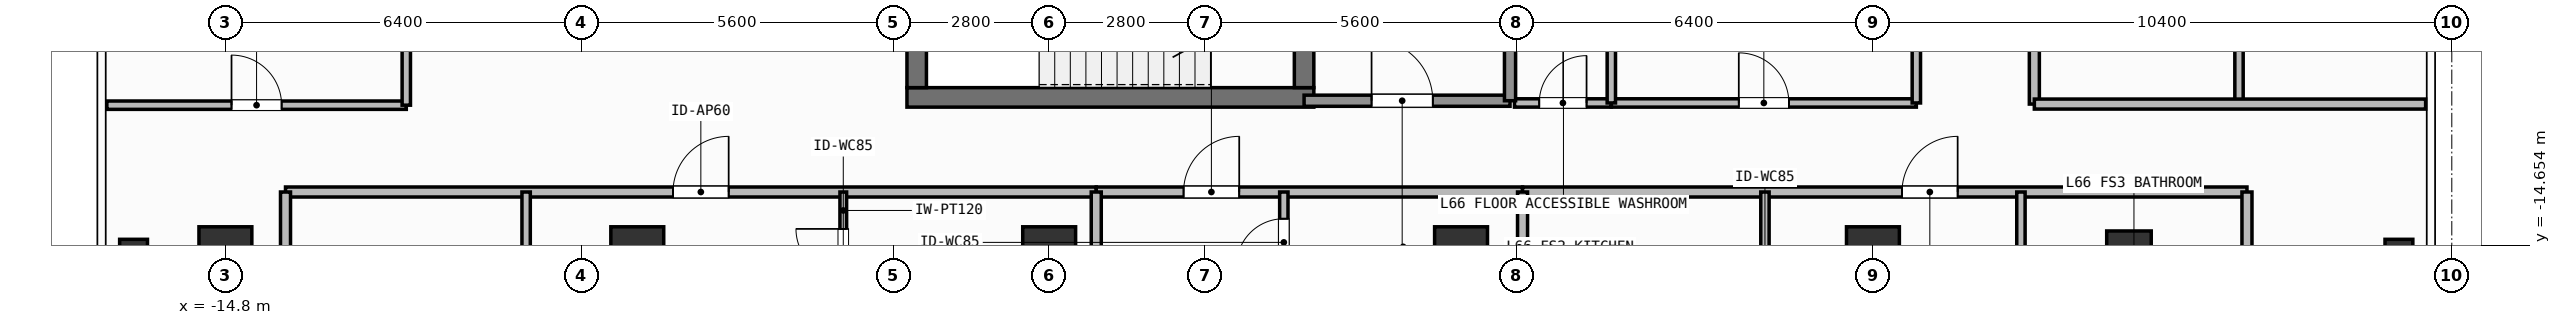
"""IFC4 building model, lengths in metres.
Left out: names, types, materials, properties, quantities, classifications, styles, units other than length and angle.
Written with IfcOpenShell. Run it as: python <this file> out.ifc"""

import sys

from ifc_helpers import new_model, si_unit, direction, frame, frame_2d, origin, origin_2d, place, context, subcontext, project, spatial, rectangle, hollow_rectangle, extrude, element, fill, save


model = new_model("IFC4")
c1 = context("Model", 3, precision=1e-05, world=origin(), true_north=direction((0.0, 1.0)))
c2 = subcontext(c1, "Body", "Model", "MODEL_VIEW")
j1 = project(units=[si_unit("LENGTHUNIT", "METRE"), si_unit("PLANEANGLEUNIT", "RADIAN")], contexts=[c1])
p1 = place(None, origin())
s1 = spatial("IfcSite", under=j1, at=p1, CompositionType="ELEMENT")
p2 = place(p1, origin())
s2 = spatial("IfcBuilding", under=s1, at=p2, CompositionType="ELEMENT")
p3 = place(p2, frame((0.0, 0.0, 270.3)))
s3 = spatial("IfcBuildingStorey", under=s2, at=p3, CompositionType="ELEMENT", Elevation=270.3)
p4 = place(p3, frame((-2.555, -12.0, 0.0), z_axis=(0.0, 0.0, 1.0), x_axis=(1.0, 0.0, 0.0)))
e1 = element("IfcWall", 1, at=p4, inside=s3, PredefinedType="SHEAR", context=c2, shape_type="SweptSolid", body=[
    extrude(rectangle(XDim=7.31, YDim=0.35, at=frame_2d((3.655, 0.0))), origin(), (0.0, 0.0, 1.0), 3.9),
])
p5 = place(p3, frame((-2.38, -11.825, 0.0), z_axis=(0.0, 0.0, 1.0), x_axis=(0.0, 1.0, 0.0)))
e2 = element("IfcWall", 2, at=p5, inside=s3, PredefinedType="SHEAR", context=c2, shape_type="SweptSolid", body=[
    extrude(rectangle(XDim=2.925, YDim=0.35, at=frame_2d((1.462, 0.0))), origin(), (0.0, 0.0, 1.0), 3.9),
])
p6 = place(p3, frame((4.58, -8.9, 0.0), z_axis=(0.0, 0.0, 1.0), x_axis=(0.0, -1.0, 0.0)))
e3 = element("IfcWall", 3, at=p6, inside=s3, PredefinedType="SHEAR", context=c2, shape_type="SweptSolid", body=[
    extrude(rectangle(XDim=2.925, YDim=0.35, at=frame_2d((1.462, 0.0))), origin(), (0.0, 0.0, 1.0), 3.9),
])
p7 = place(p6, frame((0.913, 0.0, 0.0)))
e4 = element("IfcOpeningElement", 4, at=p7, cuts=e3, PredefinedType="OPENING", context=c2, shape_type="SweptSolid", body=[
    extrude(rectangle(XDim=1.1, YDim=2.15, at=frame_2d((0.55, 1.075))), frame((0.0, 0.185, 0.0), z_axis=(0.0, -1.0, 0.0), x_axis=(1.0, 0.0, 0.0)), (0.0, 0.0, 1.0), 0.37),
])
for number, where, z_axis, x_axis in (
    (5, (-14.8, -14.8, 0.0), (0.0, 0.0, 1.0), (1.0, 0.0, 0.0)),
    (6, (-7.4, -14.8, 0.0), (0.0, 0.0, 1.0), (1.0, 0.0, 0.0)),
    (7, (0.0, -14.8, 0.0), (0.0, 0.0, 1.0), (1.0, 0.0, 0.0)),
    (8, (7.4, -14.8, 0.0), (0.0, 0.0, 1.0), (1.0, 0.0, 0.0)),
    (9, (14.8, -14.8, 0.0), (0.0, 0.0, 1.0), (1.0, 0.0, 0.0)),
):
    element("IfcColumn", number, at=place(p3, frame(where, z_axis=z_axis, x_axis=x_axis)), inside=s3, PredefinedType="COLUMN", context=c2, shape_type="SweptSolid", body=[
        extrude(rectangle(XDim=0.95, YDim=0.95, at=origin_2d()), origin(), (0.0, 0.0, 1.0), 3.9),
    ])
p8 = place(p3, frame((19.4, -14.8, 0.0), z_axis=(0.0, 0.0, 1.0), x_axis=(1.0, 0.0, 0.0)))
e10 = element("IfcColumn", 10, at=p8, inside=s3, PredefinedType="COLUMN", context=c2, shape_type="SweptSolid", body=[
    extrude(hollow_rectangle(XDim=0.8, YDim=0.8, WallThickness=0.036, at=origin_2d()), origin(), (0.0, 0.0, 1.0), 3.9),
])
for number, where, z_axis, x_axis in (
    (11, (-16.45, -14.8, 0.0), (0.0, 0.0, 1.0), (1.0, 0.0, 0.0)),
    (12, (24.25, -14.8, 0.0), (0.0, 0.0, 1.0), (1.0, 0.0, 0.0)),
):
    element("IfcColumn", number, at=place(p3, frame(where, z_axis=z_axis, x_axis=x_axis)), inside=s3, PredefinedType="COLUMN", context=c2, shape_type="SweptSolid", body=[
        extrude(hollow_rectangle(XDim=0.5, YDim=0.5, WallThickness=0.025, at=origin_2d()), origin(), (0.0, 0.0, 1.0), 3.9),
    ])
p9 = place(p3, frame((4.58, -12.06, 0.0), z_axis=(0.0, 0.0, 1.0), x_axis=(1.0, 0.0, 0.0)))
e13 = element("IfcWall", 13, at=p9, inside=s3, PredefinedType="SOLIDWALL", context=c2, shape_type="SweptSolid", body=[
    extrude(rectangle(XDim=3.7, YDim=0.2, at=frame_2d((1.85, 0.0))), origin(), (0.0, 0.0, 1.0), 3.68),
])
p10 = place(p9, frame((1.212, 0.0, 0.0)))
e14 = element("IfcOpeningElement", 14, at=p10, cuts=e13, PredefinedType="OPENING", context=c2, shape_type="SweptSolid", body=[
    extrude(rectangle(XDim=1.1, YDim=2.15, at=frame_2d((0.55, 1.075))), frame((0.0, 0.11, 0.0), z_axis=(0.0, -1.0, 0.0), x_axis=(1.0, 0.0, 0.0)), (0.0, 0.0, 1.0), 0.22),
])
p11 = place(p3, frame((8.36, -12.1, 0.0), z_axis=(0.0, 0.0, 1.0), x_axis=(1.0, 0.0, 0.0)))
e15 = element("IfcWall", 15, at=p11, inside=s3, PredefinedType="PARTITIONING", context=c2, shape_type="SweptSolid", body=[
    extrude(rectangle(XDim=1.74, YDim=0.15, at=frame_2d((0.87, 0.0))), origin(), (0.0, 0.0, 1.0), 3.68),
])
p12 = place(p11, frame((0.445, 0.0, 0.0)))
e16 = element("IfcOpeningElement", 16, at=p12, cuts=e15, PredefinedType="OPENING", context=c2, shape_type="SweptSolid", body=[
    extrude(rectangle(XDim=0.85, YDim=2.1, at=frame_2d((0.425, 1.05))), frame((0.0, 0.085, 0.0), z_axis=(0.0, -1.0, 0.0), x_axis=(1.0, 0.0, 0.0)), (0.0, 0.0, 1.0), 0.17),
])
p13 = place(p3, frame((10.1, -12.1, 0.0), z_axis=(0.0, 0.0, 1.0), x_axis=(1.0, 0.0, 0.0)))
e17 = element("IfcWall", 17, at=p13, inside=s3, PredefinedType="PARTITIONING", context=c2, shape_type="SweptSolid", body=[
    extrude(rectangle(XDim=5.48, YDim=0.15, at=frame_2d((2.74, 0.0))), origin(), (0.0, 0.0, 1.0), 3.68),
])
p14 = place(p13, frame((2.29, 0.0, 0.0)))
e18 = element("IfcOpeningElement", 18, at=p14, cuts=e17, PredefinedType="OPENING", context=c2, shape_type="SweptSolid", body=[
    extrude(rectangle(XDim=0.9, YDim=2.1, at=frame_2d((0.45, 1.05))), frame((0.0, 0.085, 0.0), z_axis=(0.0, -1.0, 0.0), x_axis=(1.0, 0.0, 0.0)), (0.0, 0.0, 1.0), 0.17),
])
p15 = place(p3, frame((-13.72, -13.7, 0.0), z_axis=(0.0, 0.0, 1.0), x_axis=(1.0, 0.0, 0.0)))
e19 = element("IfcWall", 19, at=p15, inside=s3, PredefinedType="PARTITIONING", context=c2, shape_type="SweptSolid", body=[
    extrude(rectangle(XDim=14.566, YDim=0.18, at=frame_2d((7.283, 0.0))), origin(), (0.0, 0.0, 1.0), 3.68),
])
p16 = place(p15, frame((6.962, 0.0, 0.0)))
e20 = element("IfcOpeningElement", 20, at=p16, cuts=e19, PredefinedType="OPENING", context=c2, shape_type="SweptSolid", body=[
    extrude(rectangle(XDim=1.0, YDim=2.2, at=frame_2d((0.5, 1.1))), frame((0.0, 0.1, 0.0), z_axis=(0.0, -1.0, 0.0), x_axis=(1.0, 0.0, 0.0)), (0.0, 0.0, 1.0), 0.2),
])
p17 = place(p3, frame((-9.397, -17.586, 0.0), z_axis=(0.0, 0.0, 1.0), x_axis=(0.0, 1.0, 0.0)))
e21 = element("IfcWall", 21, at=p17, inside=s3, PredefinedType="PARTITIONING", context=c2, shape_type="SweptSolid", body=[
    extrude(rectangle(XDim=3.886, YDim=0.15, at=frame_2d((1.943, 0.0))), origin(), (0.0, 0.0, 1.0), 3.68),
])
p18 = place(p17, frame((1.518, 0.0, 0.0)))
e22 = element("IfcOpeningElement", 22, at=p18, cuts=e21, PredefinedType="OPENING", context=c2, shape_type="SweptSolid", body=[
    extrude(rectangle(XDim=0.85, YDim=2.1, at=frame_2d((0.425, 1.05))), frame((0.0, 0.085, 0.0), z_axis=(0.0, -1.0, 0.0), x_axis=(1.0, 0.0, 0.0)), (0.0, 0.0, 1.0), 0.17),
])
p19 = place(p3, frame((-3.699, -15.876, 0.0), z_axis=(0.0, 0.0, 1.0), x_axis=(0.0, 1.0, 0.0)))
e23 = element("IfcWall", 23, at=p19, inside=s3, PredefinedType="PARTITIONING", context=c2, shape_type="SweptSolid", body=[
    extrude(rectangle(XDim=2.176, YDim=0.12, at=frame_2d((1.088, 0.0))), origin(), (0.0, 0.0, 1.0), 3.68),
])
p20 = place(p19, frame((0.663, 0.0, 0.0)))
e24 = element("IfcOpeningElement", 24, at=p20, cuts=e23, PredefinedType="OPENING", context=c2, shape_type="SweptSolid", body=[
    extrude(rectangle(XDim=0.85, YDim=2.1, at=frame_2d((0.425, 1.05))), frame((0.0, 0.07, 0.0), z_axis=(0.0, -1.0, 0.0), x_axis=(1.0, 0.0, 0.0)), (0.0, 0.0, 1.0), 0.14),
])
p21 = place(p3, frame((0.846, -13.7, 0.0), z_axis=(0.0, 0.0, 1.0), x_axis=(1.0, 0.0, 0.0)))
e25 = element("IfcWall", 25, at=p21, inside=s3, PredefinedType="PARTITIONING", context=c2, shape_type="SweptSolid", body=[
    extrude(rectangle(XDim=7.659, YDim=0.18, at=frame_2d((3.83, 0.0))), origin(), (0.0, 0.0, 1.0), 3.68),
])
p22 = place(p21, frame((1.569, 0.0, 0.0)))
e26 = element("IfcOpeningElement", 26, at=p22, cuts=e25, PredefinedType="OPENING", context=c2, shape_type="SweptSolid", body=[
    extrude(rectangle(XDim=1.0, YDim=2.2, at=frame_2d((0.5, 1.1))), frame((0.0, 0.1, 0.0), z_axis=(0.0, -1.0, 0.0), x_axis=(1.0, 0.0, 0.0)), (0.0, 0.0, 1.0), 0.2),
])
p23 = place(p3, frame((4.216, -15.67, 0.0), z_axis=(0.0, 0.0, 1.0), x_axis=(0.0, 1.0, 0.0)))
e27 = element("IfcWall", 27, at=p23, inside=s3, PredefinedType="PARTITIONING", context=c2, shape_type="SweptSolid", body=[
    extrude(rectangle(XDim=1.97, YDim=0.15, at=frame_2d((0.985, 0.0))), origin(), (0.0, 0.0, 1.0), 3.68),
])
p24 = place(p23, frame((0.64, 0.0, 0.0)))
e28 = element("IfcOpeningElement", 28, at=p24, cuts=e27, PredefinedType="OPENING", context=c2, shape_type="SweptSolid", body=[
    extrude(rectangle(XDim=0.85, YDim=2.1, at=frame_2d((0.425, 1.05))), frame((0.0, 0.085, 0.0), z_axis=(0.0, -1.0, 0.0), x_axis=(1.0, 0.0, 0.0)), (0.0, 0.0, 1.0), 0.17),
])
p25 = place(p3, frame((8.505, -13.7, 0.0), z_axis=(0.0, 0.0, 1.0), x_axis=(1.0, 0.0, 0.0)))
e29 = element("IfcWall", 29, at=p25, inside=s3, PredefinedType="PARTITIONING", context=c2, shape_type="SweptSolid", body=[
    extrude(rectangle(XDim=13.015, YDim=0.18, at=frame_2d((6.508, 0.0))), origin(), (0.0, 0.0, 1.0), 3.68),
])
p26 = place(p25, frame((6.817, 0.0, 0.0)))
e30 = element("IfcOpeningElement", 30, at=p26, cuts=e29, PredefinedType="OPENING", context=c2, shape_type="SweptSolid", body=[
    extrude(rectangle(XDim=1.0, YDim=2.2, at=frame_2d((0.5, 1.1))), frame((0.0, 0.1, 0.0), z_axis=(0.0, -1.0, 0.0), x_axis=(1.0, 0.0, 0.0)), (0.0, 0.0, 1.0), 0.2),
])
p27 = place(p3, frame((12.86, -16.983, 0.0), z_axis=(0.0, 0.0, 1.0), x_axis=(0.0, 1.0, 0.0)))
e31 = element("IfcWall", 31, at=p27, inside=s3, PredefinedType="PARTITIONING", context=c2, shape_type="SweptSolid", body=[
    extrude(rectangle(XDim=3.283, YDim=0.15, at=frame_2d((1.642, 0.0))), origin(), (0.0, 0.0, 1.0), 3.68),
])
p28 = place(p27, frame((1.217, 0.0, 0.0)))
e32 = element("IfcOpeningElement", 32, at=p28, cuts=e31, PredefinedType="OPENING", context=c2, shape_type="SweptSolid", body=[
    extrude(rectangle(XDim=0.85, YDim=2.1, at=frame_2d((0.425, 1.05))), frame((0.0, 0.085, 0.0), z_axis=(0.0, -1.0, 0.0), x_axis=(1.0, 0.0, 0.0)), (0.0, 0.0, 1.0), 0.17),
])
p29 = place(p3, frame((17.459, -16.983, 0.0), z_axis=(0.0, 0.0, 1.0), x_axis=(0.0, 1.0, 0.0)))
e33 = element("IfcWall", 33, at=p29, inside=s3, PredefinedType="PARTITIONING", context=c2, shape_type="SweptSolid", body=[
    extrude(rectangle(XDim=3.283, YDim=0.15, at=frame_2d((1.642, 0.0))), origin(), (0.0, 0.0, 1.0), 3.68),
])
p30 = place(p29, frame((0.688, 0.0, 0.0)))
e34 = element("IfcOpeningElement", 34, at=p30, cuts=e33, PredefinedType="OPENING", context=c2, shape_type="SweptSolid", body=[
    extrude(rectangle(XDim=0.85, YDim=2.1, at=frame_2d((0.425, 1.05))), frame((0.0, 0.085, 0.0), z_axis=(0.0, -1.0, 0.0), x_axis=(1.0, 0.0, 0.0)), (0.0, 0.0, 1.0), 0.17),
])
p31 = place(p3, frame((-16.93, -12.14, 0.0), z_axis=(0.0, 0.0, 1.0), x_axis=(1.0, 0.0, 0.0)))
e35 = element("IfcWall", 35, at=p31, inside=s3, PredefinedType="PARTITIONING", context=c2, shape_type="SweptSolid", body=[
    extrude(rectangle(XDim=5.38, YDim=0.15, at=frame_2d((2.69, 0.0))), origin(), (0.0, 0.0, 1.0), 3.68),
])
p32 = place(p31, frame((2.24, 0.0, 0.0)))
e36 = element("IfcOpeningElement", 36, at=p32, cuts=e35, PredefinedType="OPENING", context=c2, shape_type="SweptSolid", body=[
    extrude(rectangle(XDim=0.9, YDim=2.1, at=frame_2d((0.45, 1.05))), frame((0.0, 0.085, 0.0), z_axis=(0.0, -1.0, 0.0), x_axis=(1.0, 0.0, 0.0)), (0.0, 0.0, 1.0), 0.17),
])
p33 = place(p3, frame((17.7, -12.12, 0.0), z_axis=(0.0, 0.0, 1.0), x_axis=(0.0, 1.0, 0.0)))
e37 = element("IfcWall", 37, at=p33, inside=s3, PredefinedType="PARTITIONING", context=c2, shape_type="SweptSolid", body=[
    extrude(rectangle(XDim=24.24, YDim=0.18, at=frame_2d((12.12, 0.0))), origin(), (0.0, 0.0, 1.0), 3.68),
])
p34 = place(p33, frame((11.62, 0.0, 0.0)))
e38 = element("IfcOpeningElement", 38, at=p34, cuts=e37, PredefinedType="OPENING", context=c2, shape_type="SweptSolid", body=[
    extrude(rectangle(XDim=1.0, YDim=2.2, at=frame_2d((0.5, 1.1))), frame((0.0, 0.1, 0.0), z_axis=(0.0, -1.0, 0.0), x_axis=(1.0, 0.0, 0.0)), (0.0, 0.0, 1.0), 0.2),
])
p35 = place(p3, frame((8.28, -12.06, 0.0), z_axis=(0.0, 0.0, 1.0), x_axis=(0.0, 1.0, 0.0)))
e39 = element("IfcWall", 39, at=p35, inside=s3, PredefinedType="SOLIDWALL", context=c2, shape_type="SweptSolid", body=[
    extrude(rectangle(XDim=3.335, YDim=0.2, at=frame_2d((1.667, 0.0))), origin(), (0.0, 0.0, 1.0), 3.68),
])
p36 = place(p3, frame((10.1, -12.1, 0.0), z_axis=(0.0, 0.0, 1.0), x_axis=(0.0, 1.0, 0.0)))
e40 = element("IfcWall", 40, at=p36, inside=s3, PredefinedType="PARTITIONING", context=c2, shape_type="SweptSolid", body=[
    extrude(rectangle(XDim=2.35, YDim=0.15, at=frame_2d((1.175, 0.0))), origin(), (0.0, 0.0, 1.0), 3.68),
])
p37 = place(p3, frame((15.58, -12.1, 0.0), z_axis=(0.0, 0.0, 1.0), x_axis=(0.0, 1.0, 0.0)))
e41 = element("IfcWall", 41, at=p37, inside=s3, PredefinedType="PARTITIONING", context=c2, shape_type="SweptSolid", body=[
    extrude(rectangle(XDim=6.25, YDim=0.15, at=frame_2d((3.125, 0.0))), origin(), (0.0, 0.0, 1.0), 3.68),
])
for number, where, z_axis, x_axis in (
    (42, (-13.72, -19.51, 0.0), (0.0, 0.0, 1.0), (0.0, 1.0, 0.0)),
    (43, (21.52, -19.51, 0.0), (0.0, 0.0, 1.0), (0.0, 1.0, 0.0)),
):
    element("IfcWall", number, at=place(p3, frame(where, z_axis=z_axis, x_axis=x_axis)), inside=s3, PredefinedType="PARTITIONING", context=c2, shape_type="SweptSolid", body=[
        extrude(rectangle(XDim=5.81, YDim=0.18, at=frame_2d((2.905, 0.0))), origin(), (0.0, 0.0, 1.0), 3.68),
    ])
for number, where, z_axis, x_axis in (
    (44, (0.846, -20.63, 0.0), (0.0, 0.0, 1.0), (0.0, 1.0, 0.0)),
    (45, (8.505, -20.63, 0.0), (0.0, 0.0, 1.0), (0.0, 1.0, 0.0)),
):
    element("IfcWall", number, at=place(p3, frame(where, z_axis=z_axis, x_axis=x_axis)), inside=s3, PredefinedType="PARTITIONING", context=c2, shape_type="SweptSolid", body=[
        extrude(rectangle(XDim=6.93, YDim=0.18, at=frame_2d((3.465, 0.0))), origin(), (0.0, 0.0, 1.0), 3.68),
    ])
p38 = place(p3, frame((-11.55, -12.14, 0.0), z_axis=(0.0, 0.0, 1.0), x_axis=(0.0, 1.0, 0.0)))
e46 = element("IfcWall", 46, at=p38, inside=s3, PredefinedType="PARTITIONING", context=c2, shape_type="SweptSolid", body=[
    extrude(rectangle(XDim=16.24, YDim=0.15, at=frame_2d((8.12, 0.0))), origin(), (0.0, 0.0, 1.0), 3.68),
])
p39 = place(p3, frame((21.377, -12.12, 0.0), z_axis=(0.0, 0.0, 1.0), x_axis=(0.0, 1.0, 0.0)))
e47 = element("IfcWall", 47, at=p39, inside=s3, PredefinedType="PARTITIONING", context=c2, shape_type="SweptSolid", body=[
    extrude(rectangle(XDim=6.692, YDim=0.15, at=frame_2d((3.346, 0.0))), origin(), (0.0, 0.0, 1.0), 3.68),
])
p40 = place(p3, frame((17.7, -12.12, 0.0), z_axis=(0.0, 0.0, 1.0), x_axis=(1.0, 0.0, 0.0)))
e48 = element("IfcWall", 48, at=p40, inside=s3, PredefinedType="PARTITIONING", context=c2, shape_type="SweptSolid", body=[
    extrude(rectangle(XDim=7.03, YDim=0.18, at=frame_2d((3.515, 0.0))), origin(), (0.0, 0.0, 1.0), 3.68),
])
p41 = place(p10, origin())
e49 = element("IfcDoor", 49, at=p41, inside=s3, OperationType="SINGLE_SWING_LEFT", PredefinedType="DOOR", context=c2, shape_type="SweptSolid", body=[
    extrude(rectangle(XDim=1.1, YDim=2.15, at=frame_2d((0.55, 1.075))), frame((0.0, 0.025, 0.0), z_axis=(0.0, -1.0, 0.0), x_axis=(1.0, 0.0, 0.0)), (0.0, 0.0, 1.0), 0.05),
])
fill(e14, e49)
p42 = place(p12, origin())
e50 = element("IfcDoor", 50, at=p42, inside=s3, OperationType="SINGLE_SWING_RIGHT", PredefinedType="DOOR", context=c2, shape_type="SweptSolid", body=[
    extrude(rectangle(XDim=0.85, YDim=2.1, at=frame_2d((0.425, 1.05))), frame((0.0, 0.025, 0.0), z_axis=(0.0, -1.0, 0.0), x_axis=(1.0, 0.0, 0.0)), (0.0, 0.0, 1.0), 0.05),
])
fill(e16, e50)
p43 = place(p14, origin())
e51 = element("IfcDoor", 51, at=p43, inside=s3, OperationType="SINGLE_SWING_LEFT", PredefinedType="DOOR", context=c2, shape_type="SweptSolid", body=[
    extrude(rectangle(XDim=0.9, YDim=2.1, at=frame_2d((0.45, 1.05))), frame((0.0, 0.025, 0.0), z_axis=(0.0, -1.0, 0.0), x_axis=(1.0, 0.0, 0.0)), (0.0, 0.0, 1.0), 0.05),
])
fill(e18, e51)
p44 = place(p16, origin())
e52 = element("IfcDoor", 52, at=p44, inside=s3, OperationType="SINGLE_SWING_RIGHT", PredefinedType="DOOR", context=c2, shape_type="SweptSolid", body=[
    extrude(rectangle(XDim=1.0, YDim=2.2, at=frame_2d((0.5, 1.1))), frame((0.0, 0.025, 0.0), z_axis=(0.0, -1.0, 0.0), x_axis=(1.0, 0.0, 0.0)), (0.0, 0.0, 1.0), 0.05),
])
fill(e20, e52)
p45 = place(p20, origin())
e53 = element("IfcDoor", 53, at=p45, inside=s3, OperationType="SINGLE_SWING_RIGHT", PredefinedType="DOOR", context=c2, shape_type="SweptSolid", body=[
    extrude(rectangle(XDim=0.85, YDim=2.1, at=frame_2d((0.425, 1.05))), frame((0.0, 0.025, 0.0), z_axis=(0.0, -1.0, 0.0), x_axis=(1.0, 0.0, 0.0)), (0.0, 0.0, 1.0), 0.05),
])
fill(e24, e53)
p46 = place(p22, origin())
e54 = element("IfcDoor", 54, at=p46, inside=s3, OperationType="SINGLE_SWING_RIGHT", PredefinedType="DOOR", context=c2, shape_type="SweptSolid", body=[
    extrude(rectangle(XDim=1.0, YDim=2.2, at=frame_2d((0.5, 1.1))), frame((0.0, 0.025, 0.0), z_axis=(0.0, -1.0, 0.0), x_axis=(1.0, 0.0, 0.0)), (0.0, 0.0, 1.0), 0.05),
])
fill(e26, e54)
p47 = place(p24, origin())
e55 = element("IfcDoor", 55, at=p47, inside=s3, OperationType="SINGLE_SWING_LEFT", PredefinedType="DOOR", context=c2, shape_type="SweptSolid", body=[
    extrude(rectangle(XDim=0.85, YDim=2.1, at=frame_2d((0.425, 1.05))), frame((0.0, 0.025, 0.0), z_axis=(0.0, -1.0, 0.0), x_axis=(1.0, 0.0, 0.0)), (0.0, 0.0, 1.0), 0.05),
])
fill(e28, e55)
p48 = place(p26, origin())
e56 = element("IfcDoor", 56, at=p48, inside=s3, OperationType="SINGLE_SWING_RIGHT", PredefinedType="DOOR", context=c2, shape_type="SweptSolid", body=[
    extrude(rectangle(XDim=1.0, YDim=2.2, at=frame_2d((0.5, 1.1))), frame((0.0, 0.025, 0.0), z_axis=(0.0, -1.0, 0.0), x_axis=(1.0, 0.0, 0.0)), (0.0, 0.0, 1.0), 0.05),
])
fill(e30, e56)
p49 = place(p32, origin())
e57 = element("IfcDoor", 57, at=p49, inside=s3, OperationType="SINGLE_SWING_LEFT", PredefinedType="DOOR", context=c2, shape_type="SweptSolid", body=[
    extrude(rectangle(XDim=0.9, YDim=2.1, at=frame_2d((0.45, 1.05))), frame((0.0, 0.025, 0.0), z_axis=(0.0, -1.0, 0.0), x_axis=(1.0, 0.0, 0.0)), (0.0, 0.0, 1.0), 0.05),
])
fill(e36, e57)
save(model, sys.argv[1])
